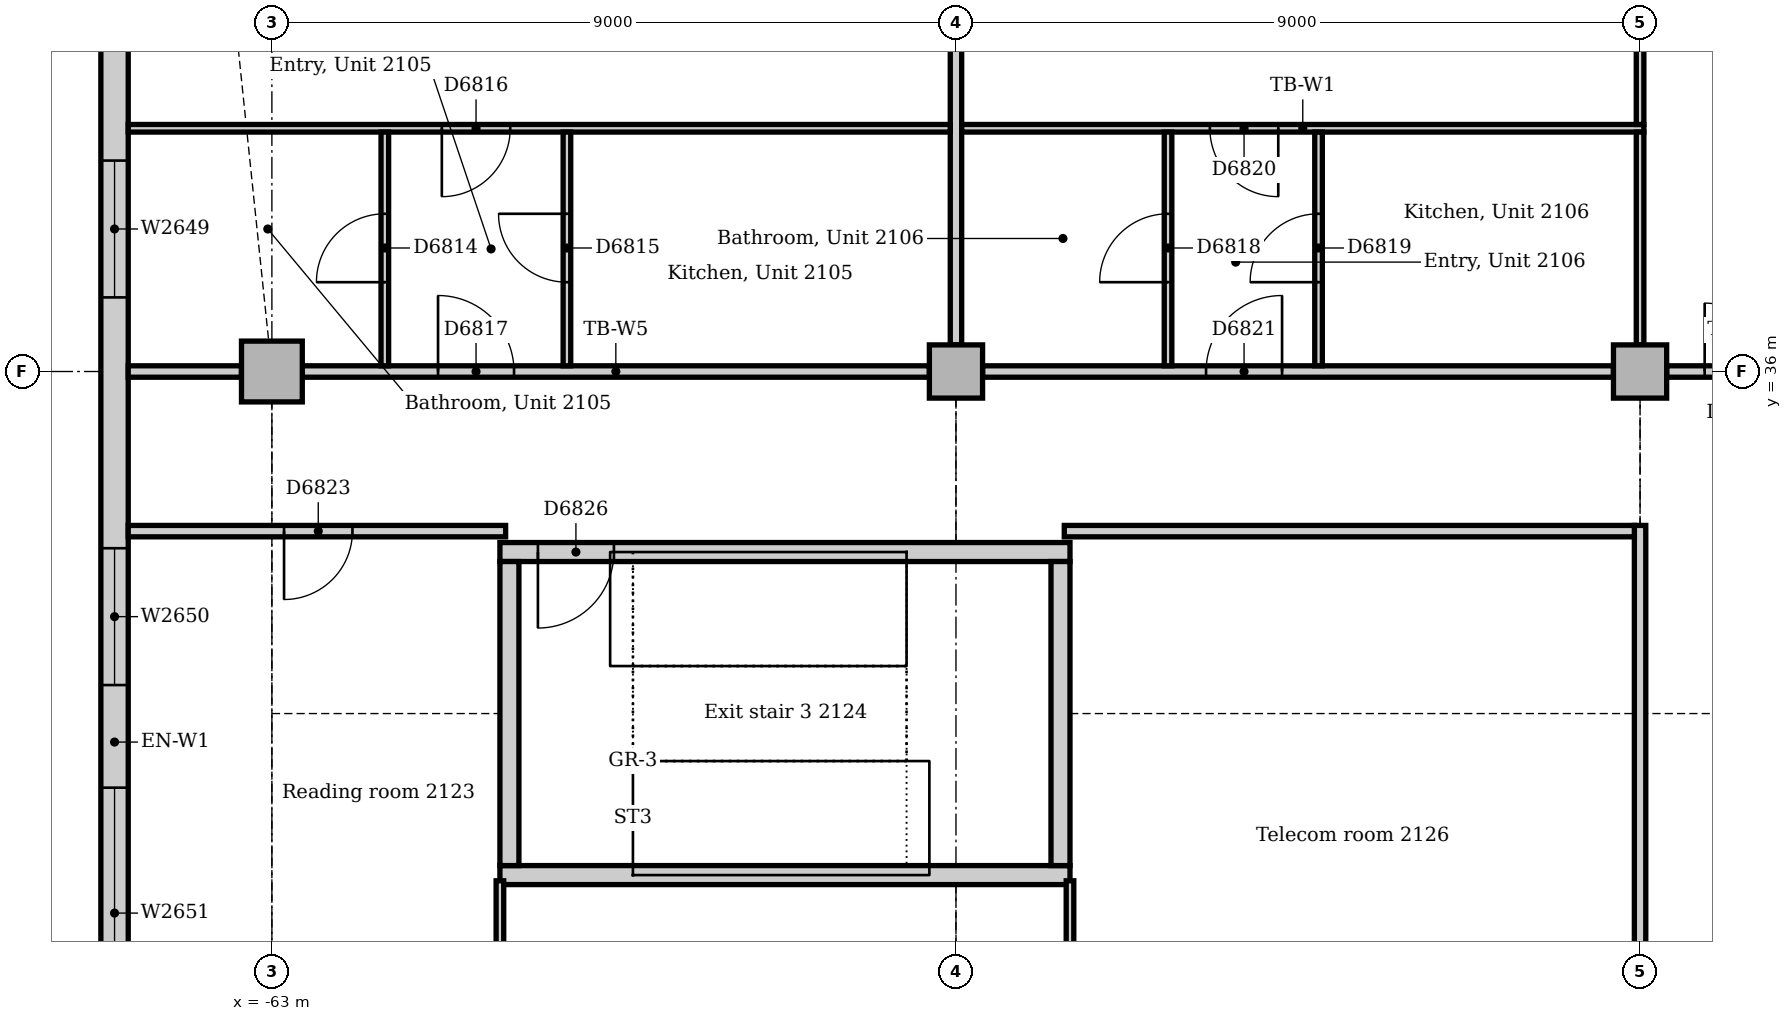
"""IFC4 building model, lengths in metres.
Left out: names, types, materials, properties, quantities, classifications, styles, units other than length and angle.
Written with IfcOpenShell. Run it as: python <this file> out.ifc"""

import sys

from ifc_helpers import new_model, si_unit, direction, frame, frame_2d, origin, origin_2d, place, context, subcontext, project, spatial, rectangle, extrude, element, fill, save


model = new_model("IFC4")
c1 = context("Model", 3, precision=1e-05, world=origin(), true_north=direction((0.0, 1.0)))
c2 = subcontext(c1, "Body", "Model", "MODEL_VIEW")
j1 = project(units=[si_unit("LENGTHUNIT", "METRE"), si_unit("PLANEANGLEUNIT", "RADIAN")], contexts=[c1])
p1 = place(None, origin())
s1 = spatial("IfcSite", under=j1, at=p1, CompositionType="ELEMENT")
p2 = place(p1, origin())
s2 = spatial("IfcBuilding", under=s1, at=p2, CompositionType="ELEMENT")
p3 = place(p2, frame((0.0, 0.0, 91.0)))
s3 = spatial("IfcBuildingStorey", under=s2, at=p3, CompositionType="ELEMENT", Elevation=91.0)
p4 = place(p3, frame((-60.0, 29.375, 0.0), z_axis=(0.0, 0.0, 1.0), x_axis=(1.0, 0.0, 0.0)))
e1 = element("IfcWall", 1, at=p4, inside=s3, PredefinedType="SOLIDWALL", context=c2, shape_type="SweptSolid", body=[
    extrude(rectangle(XDim=7.5, YDim=0.25, at=frame_2d((3.75, 0.0))), origin(), (0.0, 0.0, 1.0), 4.0),
])
p5 = place(p3, frame((-52.5, 33.625, 0.0), z_axis=(0.0, 0.0, 1.0), x_axis=(-1.0, 0.0, 0.0)))
e2 = element("IfcWall", 2, at=p5, inside=s3, PredefinedType="SOLIDWALL", context=c2, shape_type="SweptSolid", body=[
    extrude(rectangle(XDim=7.5, YDim=0.25, at=frame_2d((3.75, 0.0))), origin(), (0.0, 0.0, 1.0), 4.0),
])
p6 = place(p5, frame((6.0, 0.0, 0.0)))
e3 = element("IfcOpeningElement", 3, at=p6, cuts=e2, PredefinedType="OPENING", context=c2, shape_type="SweptSolid", body=[
    extrude(rectangle(XDim=1.0, YDim=2.1, at=frame_2d((0.5, 1.05))), frame((0.0, 0.135, 0.0), z_axis=(0.0, -1.0, 0.0), x_axis=(1.0, 0.0, 0.0)), (0.0, 0.0, 1.0), 0.27),
])
for number, where, z_axis, x_axis in (
    (4, (-52.625, 29.5, 0.0), (0.0, 0.0, 1.0), (0.0, 1.0, 0.0)),
    (5, (-59.875, 33.5, 0.0), (0.0, 0.0, 1.0), (0.0, -1.0, 0.0)),
):
    element("IfcWall", number, at=place(p3, frame(where, z_axis=z_axis, x_axis=x_axis)), inside=s3, PredefinedType="SOLIDWALL", context=c2, shape_type="SweptSolid", body=[
        extrude(rectangle(XDim=4.0, YDim=0.25, at=frame_2d((2.0, 0.0))), origin(), (0.0, 0.0, 1.0), 4.0),
    ])
p7 = place(p3, frame((-63.0, 36.0, 0.0), z_axis=(0.0, 0.0, 1.0), x_axis=(1.0, 0.0, 0.0)))
e6 = element("IfcColumn", 6, at=p7, inside=s3, PredefinedType="COLUMN", context=c2, shape_type="SweptSolid", body=[
    extrude(rectangle(XDim=0.8, YDim=0.8, at=origin_2d()), origin(), (0.0, 0.0, 1.0), 3.7),
])
for number, where, z_axis, x_axis in (
    (7, (-54.0, 36.0, 0.0), (0.0, 0.0, 1.0), (1.0, 0.0, 0.0)),
    (8, (-45.0, 36.0, 0.0), (0.0, 0.0, 1.0), (1.0, 0.0, 0.0)),
):
    element("IfcColumn", number, at=place(p3, frame(where, z_axis=z_axis, x_axis=x_axis)), inside=s3, PredefinedType="COLUMN", context=c2, shape_type="SweptSolid", body=[
        extrude(rectangle(XDim=0.7, YDim=0.7, at=origin_2d()), origin(), (0.0, 0.0, 1.0), 3.7),
    ])
p8 = place(p3, frame((-65.07, 43.007, 0.0), z_axis=(0.0, 0.0, 1.0), x_axis=(0.0, -1.0, 0.0)))
e9 = element("IfcWall", 9, at=p8, inside=s3, PredefinedType="STANDARD", context=c2, shape_type="SweptSolid", body=[
    extrude(rectangle(XDim=23.765, YDim=0.36, at=frame_2d((11.882, 0.0))), origin(), (0.0, 0.0, 1.0), 3.7),
])
p9 = place(p8, frame((4.232, 0.0, 0.9)))
e10 = element("IfcOpeningElement", 10, at=p9, cuts=e9, PredefinedType="OPENING", context=c2, shape_type="SweptSolid", body=[
    extrude(rectangle(XDim=1.8, YDim=1.6, at=frame_2d((0.9, 0.8))), frame((0.0, 0.19, 0.0), z_axis=(0.0, -1.0, 0.0), x_axis=(1.0, 0.0, 0.0)), (0.0, 0.0, 1.0), 0.38),
])
p10 = place(p8, frame((9.332, 0.0, 0.9)))
e11 = element("IfcOpeningElement", 11, at=p10, cuts=e9, PredefinedType="OPENING", context=c2, shape_type="SweptSolid", body=[
    extrude(rectangle(XDim=1.8, YDim=1.6, at=frame_2d((0.9, 0.8))), frame((0.0, 0.19, 0.0), z_axis=(0.0, -1.0, 0.0), x_axis=(1.0, 0.0, 0.0)), (0.0, 0.0, 1.0), 0.38),
])
p11 = place(p8, frame((12.482, 0.0, 0.9)))
e12 = element("IfcOpeningElement", 12, at=p11, cuts=e9, PredefinedType="OPENING", context=c2, shape_type="SweptSolid", body=[
    extrude(rectangle(XDim=3.3, YDim=1.6, at=frame_2d((1.65, 0.8))), frame((0.0, 0.19, 0.0), z_axis=(0.0, -1.0, 0.0), x_axis=(1.0, 0.0, 0.0)), (0.0, 0.0, 1.0), 0.38),
])
p12 = place(p8, frame((16.982, 0.0, 0.9)))
e13 = element("IfcOpeningElement", 13, at=p12, cuts=e9, PredefinedType="OPENING", context=c2, shape_type="SweptSolid", body=[
    extrude(rectangle(XDim=3.3, YDim=1.6, at=frame_2d((1.65, 0.8))), frame((0.0, 0.19, 0.0), z_axis=(0.0, -1.0, 0.0), x_axis=(1.0, 0.0, 0.0)), (0.0, 0.0, 1.0), 0.38),
])
p13 = place(p3, frame((-44.65, 36.0, 0.0), z_axis=(0.0, 0.0, 1.0), x_axis=(1.0, 0.0, 0.0)))
e14 = element("IfcWall", 14, at=p13, inside=s3, PredefinedType="PARTITIONING", context=c2, shape_type="SweptSolid", body=[
    extrude(rectangle(XDim=1.925, YDim=0.15, at=frame_2d((0.963, 0.0))), origin(), (0.0, 0.0, 1.0), 3.452),
])
p14 = place(p13, frame((0.5, 0.0, 0.0)))
e15 = element("IfcOpeningElement", 15, at=p14, cuts=e14, PredefinedType="OPENING", context=c2, shape_type="SweptSolid", body=[
    extrude(rectangle(XDim=0.9, YDim=2.1, at=frame_2d((0.45, 1.05))), frame((0.0, 0.085, 0.0), z_axis=(0.0, -1.0, 0.0), x_axis=(1.0, 0.0, 0.0)), (0.0, 0.0, 1.0), 0.17),
])
p15 = place(p3, frame((-53.65, 36.0, 0.0), z_axis=(0.0, 0.0, 1.0), x_axis=(1.0, 0.0, 0.0)))
e16 = element("IfcWall", 16, at=p15, inside=s3, PredefinedType="PARTITIONING", context=c2, shape_type="SweptSolid", body=[
    extrude(rectangle(XDim=8.3, YDim=0.15, at=frame_2d((4.15, 0.0))), origin(), (0.0, 0.0, 1.0), 3.008),
])
p16 = place(p15, frame((2.94, 0.0, 0.0)))
e17 = element("IfcOpeningElement", 17, at=p16, cuts=e16, PredefinedType="OPENING", context=c2, shape_type="SweptSolid", body=[
    extrude(rectangle(XDim=1.0, YDim=2.1, at=frame_2d((0.5, 1.05))), frame((0.0, 0.085, 0.0), z_axis=(0.0, -1.0, 0.0), x_axis=(1.0, 0.0, 0.0)), (0.0, 0.0, 1.0), 0.17),
])
p17 = place(p3, frame((-62.6, 36.0, 0.0), z_axis=(0.0, 0.0, 1.0), x_axis=(1.0, 0.0, 0.0)))
e18 = element("IfcWall", 18, at=p17, inside=s3, PredefinedType="PARTITIONING", context=c2, shape_type="SweptSolid", body=[
    extrude(rectangle(XDim=8.25, YDim=0.15, at=frame_2d((4.125, 0.0))), origin(), (0.0, 0.0, 1.0), 3.008),
])
p18 = place(p17, frame((1.786, 0.0, 0.0)))
e19 = element("IfcOpeningElement", 19, at=p18, cuts=e18, PredefinedType="OPENING", context=c2, shape_type="SweptSolid", body=[
    extrude(rectangle(XDim=1.0, YDim=2.1, at=frame_2d((0.5, 1.05))), frame((0.0, 0.085, 0.0), z_axis=(0.0, -1.0, 0.0), x_axis=(1.0, 0.0, 0.0)), (0.0, 0.0, 1.0), 0.17),
])
p19 = place(p3, frame((-64.89, 36.0, 0.0), z_axis=(0.0, 0.0, 1.0), x_axis=(1.0, 0.0, 0.0)))
e20 = element("IfcWall", 20, at=p19, inside=s3, PredefinedType="PARTITIONING", context=c2, shape_type="SweptSolid", body=[
    extrude(rectangle(XDim=1.49, YDim=0.15, at=frame_2d((0.745, 0.0))), origin(), (0.0, 0.0, 1.0), 3.7),
])
p20 = place(p3, frame((-45.0, 27.35, 0.0), z_axis=(0.0, 0.0, 1.0), x_axis=(0.0, 1.0, 0.0)))
e21 = element("IfcWall", 21, at=p20, inside=s3, PredefinedType="PARTITIONING", context=c2, shape_type="SweptSolid", body=[
    extrude(rectangle(XDim=6.625, YDim=0.15, at=frame_2d((3.312, 0.0))), origin(), (0.0, 0.0, 1.0), 3.106),
])
p21 = place(p3, frame((-52.575, 33.9, 0.0), z_axis=(0.0, 0.0, 1.0), x_axis=(1.0, 0.0, 0.0)))
e22 = element("IfcWall", 22, at=p21, inside=s3, PredefinedType="PARTITIONING", context=c2, shape_type="SweptSolid", body=[
    extrude(rectangle(XDim=7.5, YDim=0.15, at=frame_2d((3.75, 0.0))), origin(), (0.0, 0.0, 1.0), 3.7),
])
p22 = place(p3, frame((-64.89, 33.9, 0.0), z_axis=(0.0, 0.0, 1.0), x_axis=(1.0, 0.0, 0.0)))
e23 = element("IfcWall", 23, at=p22, inside=s3, PredefinedType="PARTITIONING", context=c2, shape_type="SweptSolid", body=[
    extrude(rectangle(XDim=4.965, YDim=0.15, at=frame_2d((2.482, 0.0))), origin(), (0.0, 0.0, 1.0), 3.7),
])
p23 = place(p22, frame((2.05, 0.0, 0.0)))
e24 = element("IfcOpeningElement", 24, at=p23, cuts=e23, PredefinedType="OPENING", context=c2, shape_type="SweptSolid", body=[
    extrude(rectangle(XDim=0.9, YDim=2.1, at=frame_2d((0.45, 1.05))), frame((0.0, 0.085, 0.0), z_axis=(0.0, -1.0, 0.0), x_axis=(1.0, 0.0, 0.0)), (0.0, 0.0, 1.0), 0.17),
])
p24 = place(p3, frame((-54.0, 36.35, 0.0), z_axis=(0.0, 0.0, 1.0), x_axis=(0.0, 1.0, 0.0)))
e25 = element("IfcWall", 25, at=p24, inside=s3, PredefinedType="PARTITIONING", context=c2, shape_type="SweptSolid", body=[
    extrude(rectangle(XDim=9.6, YDim=0.15, at=frame_2d((4.8, 0.0))), origin(), (0.0, 0.0, 1.0), 3.106),
])
p25 = place(p3, frame((-53.925, 39.2, 0.0), z_axis=(0.0, 0.0, 1.0), x_axis=(1.0, 0.0, 0.0)))
e26 = element("IfcWall", 26, at=p25, inside=s3, PredefinedType="PARTITIONING", context=c2, shape_type="SweptSolid", body=[
    extrude(rectangle(XDim=8.975, YDim=0.1, at=frame_2d((4.487, 0.0))), origin(), (0.0, 0.0, 1.0), 3.7),
])
p26 = place(p25, frame((3.265, 0.0, 0.0)))
e27 = element("IfcOpeningElement", 27, at=p26, cuts=e26, PredefinedType="OPENING", context=c2, shape_type="SweptSolid", body=[
    extrude(rectangle(XDim=0.9, YDim=2.1, at=frame_2d((0.45, 1.05))), frame((0.0, 0.06, 0.0), z_axis=(0.0, -1.0, 0.0), x_axis=(1.0, 0.0, 0.0)), (0.0, 0.0, 1.0), 0.12),
])
p27 = place(p3, frame((-64.89, 39.2, 0.0), z_axis=(0.0, 0.0, 1.0), x_axis=(1.0, 0.0, 0.0)))
e28 = element("IfcWall", 28, at=p27, inside=s3, PredefinedType="PARTITIONING", context=c2, shape_type="SweptSolid", body=[
    extrude(rectangle(XDim=10.815, YDim=0.1, at=frame_2d((5.407, 0.0))), origin(), (0.0, 0.0, 1.0), 3.7),
])
p28 = place(p27, frame((4.126, 0.0, 0.0)))
e29 = element("IfcOpeningElement", 29, at=p28, cuts=e28, PredefinedType="OPENING", context=c2, shape_type="SweptSolid", body=[
    extrude(rectangle(XDim=0.9, YDim=2.1, at=frame_2d((0.45, 1.05))), frame((0.0, 0.06, 0.0), z_axis=(0.0, -1.0, 0.0), x_axis=(1.0, 0.0, 0.0)), (0.0, 0.0, 1.0), 0.12),
])
p29 = place(p3, frame((-45.0, 39.25, 0.0), z_axis=(0.0, 0.0, 1.0), x_axis=(0.0, 1.0, 0.0)))
e30 = element("IfcWall", 30, at=p29, inside=s3, PredefinedType="PARTITIONING", context=c2, shape_type="SweptSolid", body=[
    extrude(rectangle(XDim=6.7, YDim=0.1, at=frame_2d((3.35, 0.0))), origin(), (0.0, 0.0, 1.0), 3.106),
])
p30 = place(p3, frame((-45.0, 36.35, 0.0), z_axis=(0.0, 0.0, 1.0), x_axis=(0.0, 1.0, 0.0)))
e31 = element("IfcWall", 31, at=p30, inside=s3, PredefinedType="PARTITIONING", context=c2, shape_type="SweptSolid", body=[
    extrude(rectangle(XDim=2.8, YDim=0.1, at=frame_2d((1.4, 0.0))), origin(), (0.0, 0.0, 1.0), 3.106),
])
for number, where, z_axis, x_axis in (
    (32, (-60.0, 20.075, 0.0), (0.0, 0.0, 1.0), (0.0, 1.0, 0.0)),
    (33, (-52.5, 20.075, 0.0), (0.0, 0.0, 1.0), (0.0, 1.0, 0.0)),
):
    element("IfcWall", number, at=place(p3, frame(where, z_axis=z_axis, x_axis=x_axis)), inside=s3, PredefinedType="PARTITIONING", context=c2, shape_type="SweptSolid", body=[
        extrude(rectangle(XDim=9.225, YDim=0.1, at=frame_2d((4.612, 0.0))), origin(), (0.0, 0.0, 1.0), 3.7),
    ])
p31 = place(p3, frame((-61.514, 36.075, 0.0), z_axis=(0.0, 0.0, 1.0), x_axis=(0.0, 1.0, 0.0)))
e34 = element("IfcWall", 34, at=p31, inside=s3, PredefinedType="PARTITIONING", context=c2, shape_type="SweptSolid", body=[
    extrude(rectangle(XDim=3.075, YDim=0.1, at=frame_2d((1.538, 0.0))), origin(), (0.0, 0.0, 1.0), 3.7),
])
p32 = place(p31, frame((1.1, 0.0, 0.0)))
e35 = element("IfcOpeningElement", 35, at=p32, cuts=e34, PredefinedType="OPENING", context=c2, shape_type="SweptSolid", body=[
    extrude(rectangle(XDim=0.9, YDim=2.1, at=frame_2d((0.45, 1.05))), frame((0.0, 0.06, 0.0), z_axis=(0.0, -1.0, 0.0), x_axis=(1.0, 0.0, 0.0)), (0.0, 0.0, 1.0), 0.12),
])
p33 = place(p3, frame((-59.118, 36.075, 0.0), z_axis=(0.0, 0.0, 1.0), x_axis=(0.0, 1.0, 0.0)))
e36 = element("IfcWall", 36, at=p33, inside=s3, PredefinedType="PARTITIONING", context=c2, shape_type="SweptSolid", body=[
    extrude(rectangle(XDim=3.075, YDim=0.1, at=frame_2d((1.538, 0.0))), origin(), (0.0, 0.0, 1.0), 3.7),
])
p34 = place(p33, frame((1.1, 0.0, 0.0)))
e37 = element("IfcOpeningElement", 37, at=p34, cuts=e36, PredefinedType="OPENING", context=c2, shape_type="SweptSolid", body=[
    extrude(rectangle(XDim=0.9, YDim=2.1, at=frame_2d((0.45, 1.05))), frame((0.0, 0.06, 0.0), z_axis=(0.0, -1.0, 0.0), x_axis=(1.0, 0.0, 0.0)), (0.0, 0.0, 1.0), 0.12),
])
p35 = place(p3, frame((-51.21, 36.075, 0.0), z_axis=(0.0, 0.0, 1.0), x_axis=(0.0, 1.0, 0.0)))
e38 = element("IfcWall", 38, at=p35, inside=s3, PredefinedType="PARTITIONING", context=c2, shape_type="SweptSolid", body=[
    extrude(rectangle(XDim=3.075, YDim=0.1, at=frame_2d((1.538, 0.0))), origin(), (0.0, 0.0, 1.0), 3.7),
])
p36 = place(p35, frame((1.1, 0.0, 0.0)))
e39 = element("IfcOpeningElement", 39, at=p36, cuts=e38, PredefinedType="OPENING", context=c2, shape_type="SweptSolid", body=[
    extrude(rectangle(XDim=0.9, YDim=2.1, at=frame_2d((0.45, 1.05))), frame((0.0, 0.06, 0.0), z_axis=(0.0, -1.0, 0.0), x_axis=(1.0, 0.0, 0.0)), (0.0, 0.0, 1.0), 0.12),
])
p37 = place(p3, frame((-49.23, 36.075, 0.0), z_axis=(0.0, 0.0, 1.0), x_axis=(0.0, 1.0, 0.0)))
e40 = element("IfcWall", 40, at=p37, inside=s3, PredefinedType="PARTITIONING", context=c2, shape_type="SweptSolid", body=[
    extrude(rectangle(XDim=3.075, YDim=0.1, at=frame_2d((1.538, 0.0))), origin(), (0.0, 0.0, 1.0), 3.7),
])
p38 = place(p37, frame((1.1, 0.0, 0.0)))
e41 = element("IfcOpeningElement", 41, at=p38, cuts=e40, PredefinedType="OPENING", context=c2, shape_type="SweptSolid", body=[
    extrude(rectangle(XDim=0.9, YDim=2.1, at=frame_2d((0.45, 1.05))), frame((0.0, 0.06, 0.0), z_axis=(0.0, -1.0, 0.0), x_axis=(1.0, 0.0, 0.0)), (0.0, 0.0, 1.0), 0.12),
])
p39 = place(p9, origin())
e42 = element("IfcWindow", 42, at=p39, inside=s3, PartitioningType="SINGLE_PANEL", PredefinedType="WINDOW", context=c2, shape_type="SweptSolid", body=[
    extrude(rectangle(XDim=1.8, YDim=1.6, at=frame_2d((0.9, 0.8))), frame((0.0, 0.13, 0.0), z_axis=(0.0, -1.0, 0.0), x_axis=(1.0, 0.0, 0.0)), (0.0, 0.0, 1.0), 0.06),
])
fill(e10, e42)
p40 = place(p10, origin())
e43 = element("IfcWindow", 43, at=p40, inside=s3, PartitioningType="SINGLE_PANEL", PredefinedType="WINDOW", context=c2, shape_type="SweptSolid", body=[
    extrude(rectangle(XDim=1.8, YDim=1.6, at=frame_2d((0.9, 0.8))), frame((0.0, 0.13, 0.0), z_axis=(0.0, -1.0, 0.0), x_axis=(1.0, 0.0, 0.0)), (0.0, 0.0, 1.0), 0.06),
])
fill(e11, e43)
p41 = place(p11, origin())
e44 = element("IfcWindow", 44, at=p41, inside=s3, PartitioningType="SINGLE_PANEL", PredefinedType="WINDOW", context=c2, shape_type="SweptSolid", body=[
    extrude(rectangle(XDim=3.3, YDim=1.6, at=frame_2d((1.65, 0.8))), frame((0.0, 0.13, 0.0), z_axis=(0.0, -1.0, 0.0), x_axis=(1.0, 0.0, 0.0)), (0.0, 0.0, 1.0), 0.06),
])
fill(e12, e44)
p42 = place(p14, origin())
e45 = element("IfcDoor", 45, at=p42, inside=s3, OperationType="SINGLE_SWING_LEFT", PredefinedType="DOOR", context=c2, shape_type="SweptSolid", body=[
    extrude(rectangle(XDim=0.9, YDim=2.1, at=frame_2d((0.45, 1.05))), frame((0.0, 0.025, 0.0), z_axis=(0.0, -1.0, 0.0), x_axis=(1.0, 0.0, 0.0)), (0.0, 0.0, 1.0), 0.05),
])
fill(e15, e45)
p43 = place(p32, origin())
e46 = element("IfcDoor", 46, at=p43, inside=s3, OperationType="SINGLE_SWING_LEFT", PredefinedType="DOOR", context=c2, shape_type="SweptSolid", body=[
    extrude(rectangle(XDim=0.9, YDim=2.1, at=frame_2d((0.45, 1.05))), frame((0.0, 0.025, 0.0), z_axis=(0.0, -1.0, 0.0), x_axis=(1.0, 0.0, 0.0)), (0.0, 0.0, 1.0), 0.05),
])
fill(e35, e46)
p44 = place(p34, origin())
e47 = element("IfcDoor", 47, at=p44, inside=s3, OperationType="SINGLE_SWING_RIGHT", PredefinedType="DOOR", context=c2, shape_type="SweptSolid", body=[
    extrude(rectangle(XDim=0.9, YDim=2.1, at=frame_2d((0.45, 1.05))), frame((0.0, 0.025, 0.0), z_axis=(0.0, -1.0, 0.0), x_axis=(1.0, 0.0, 0.0)), (0.0, 0.0, 1.0), 0.05),
])
fill(e37, e47)
p45 = place(p28, frame((0.9, 0.0, 0.0), z_axis=(0.0, 0.0, 1.0), x_axis=(-1.0, 0.0, 0.0)))
e48 = element("IfcDoor", 48, at=p45, inside=s3, OperationType="SINGLE_SWING_RIGHT", PredefinedType="DOOR", context=c2, shape_type="SweptSolid", body=[
    extrude(rectangle(XDim=0.9, YDim=2.1, at=frame_2d((0.45, 1.05))), frame((0.0, 0.025, 0.0), z_axis=(0.0, -1.0, 0.0), x_axis=(1.0, 0.0, 0.0)), (0.0, 0.0, 1.0), 0.05),
])
fill(e29, e48)
p46 = place(p18, origin())
e49 = element("IfcDoor", 49, at=p46, inside=s3, OperationType="SINGLE_SWING_LEFT", PredefinedType="DOOR", context=c2, shape_type="SweptSolid", body=[
    extrude(rectangle(XDim=1.0, YDim=2.1, at=frame_2d((0.5, 1.05))), frame((0.0, 0.025, 0.0), z_axis=(0.0, -1.0, 0.0), x_axis=(1.0, 0.0, 0.0)), (0.0, 0.0, 1.0), 0.05),
])
fill(e19, e49)
p47 = place(p36, origin())
e50 = element("IfcDoor", 50, at=p47, inside=s3, OperationType="SINGLE_SWING_LEFT", PredefinedType="DOOR", context=c2, shape_type="SweptSolid", body=[
    extrude(rectangle(XDim=0.9, YDim=2.1, at=frame_2d((0.45, 1.05))), frame((0.0, 0.025, 0.0), z_axis=(0.0, -1.0, 0.0), x_axis=(1.0, 0.0, 0.0)), (0.0, 0.0, 1.0), 0.05),
])
fill(e39, e50)
p48 = place(p38, origin())
e51 = element("IfcDoor", 51, at=p48, inside=s3, OperationType="SINGLE_SWING_LEFT", PredefinedType="DOOR", context=c2, shape_type="SweptSolid", body=[
    extrude(rectangle(XDim=0.9, YDim=2.1, at=frame_2d((0.45, 1.05))), frame((0.0, 0.025, 0.0), z_axis=(0.0, -1.0, 0.0), x_axis=(1.0, 0.0, 0.0)), (0.0, 0.0, 1.0), 0.05),
])
fill(e41, e51)
p49 = place(p26, frame((0.9, 0.0, 0.0), z_axis=(0.0, 0.0, 1.0), x_axis=(-1.0, 0.0, 0.0)))
e52 = element("IfcDoor", 52, at=p49, inside=s3, OperationType="SINGLE_SWING_LEFT", PredefinedType="DOOR", context=c2, shape_type="SweptSolid", body=[
    extrude(rectangle(XDim=0.9, YDim=2.1, at=frame_2d((0.45, 1.05))), frame((0.0, 0.025, 0.0), z_axis=(0.0, -1.0, 0.0), x_axis=(1.0, 0.0, 0.0)), (0.0, 0.0, 1.0), 0.05),
])
fill(e27, e52)
p50 = place(p16, origin())
e53 = element("IfcDoor", 53, at=p50, inside=s3, OperationType="SINGLE_SWING_RIGHT", PredefinedType="DOOR", context=c2, shape_type="SweptSolid", body=[
    extrude(rectangle(XDim=1.0, YDim=2.1, at=frame_2d((0.5, 1.05))), frame((0.0, 0.025, 0.0), z_axis=(0.0, -1.0, 0.0), x_axis=(1.0, 0.0, 0.0)), (0.0, 0.0, 1.0), 0.05),
])
fill(e17, e53)
p51 = place(p23, frame((0.9, 0.0, 0.0), z_axis=(0.0, 0.0, 1.0), x_axis=(-1.0, 0.0, 0.0)))
e54 = element("IfcDoor", 54, at=p51, inside=s3, OperationType="SINGLE_SWING_RIGHT", PredefinedType="DOOR", context=c2, shape_type="SweptSolid", body=[
    extrude(rectangle(XDim=0.9, YDim=2.1, at=frame_2d((0.45, 1.05))), frame((0.0, 0.025, 0.0), z_axis=(0.0, -1.0, 0.0), x_axis=(1.0, 0.0, 0.0)), (0.0, 0.0, 1.0), 0.05),
])
fill(e24, e54)
p52 = place(p6, origin())
e55 = element("IfcDoor", 55, at=p52, inside=s3, OperationType="SINGLE_SWING_RIGHT", PredefinedType="DOOR", context=c2, shape_type="SweptSolid", body=[
    extrude(rectangle(XDim=1.0, YDim=2.1, at=frame_2d((0.5, 1.05))), frame((0.0, 0.025, 0.0), z_axis=(0.0, -1.0, 0.0), x_axis=(1.0, 0.0, 0.0)), (0.0, 0.0, 1.0), 0.05),
])
fill(e3, e55)
save(model, sys.argv[1])
